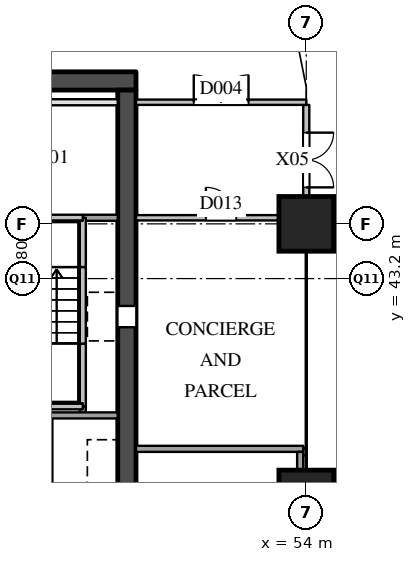
"""IFC4 building model, lengths in metres.
Left out: names, types, materials, properties, quantities, classifications, styles, units other than length and angle.
Written with IfcOpenShell. Run it as: python <this file> out.ifc"""

import sys

from ifc_helpers import new_model, si_unit, direction, frame, frame_2d, origin, origin_2d, place, context, subcontext, project, spatial, rectangle, extrude, element, fill, save


model = new_model("IFC4")
c1 = context("Model", 3, precision=1e-05, world=origin(), true_north=direction((0.0, 1.0)))
c2 = subcontext(c1, "Body", "Model", "MODEL_VIEW")
j1 = project(units=[si_unit("LENGTHUNIT", "METRE"), si_unit("PLANEANGLEUNIT", "RADIAN")], contexts=[c1])
p1 = place(None, origin())
s1 = spatial("IfcSite", under=j1, at=p1, CompositionType="ELEMENT")
p2 = place(p1, origin())
s2 = spatial("IfcBuilding", under=s1, at=p2, CompositionType="ELEMENT")
p3 = place(p2, origin())
s3 = spatial("IfcBuildingStorey", under=s2, at=p3, CompositionType="ELEMENT", Elevation=0.0)
for number, where, z_axis, x_axis in (
    (1, (54.0, 36.0, 0.0), (0.0, 0.0, 1.0), (1.0, 0.0, 0.0)),
    (2, (54.0, 45.0, 0.0), (0.0, 0.0, 1.0), (1.0, 0.0, 0.0)),
):
    element("IfcColumn", number, at=place(p3, frame(where, z_axis=z_axis, x_axis=x_axis)), inside=s3, PredefinedType="COLUMN", context=c2, shape_type="SweptSolid", body=[
        extrude(rectangle(XDim=1.8, YDim=1.8, at=origin_2d()), origin(), (0.0, 0.0, 1.0), 8.0),
    ])
p4 = place(p3, frame((54.0, 45.9, 0.0), z_axis=(0.0, 0.0, 1.0), x_axis=(0.0, 1.0, 0.0)))
e3 = element("IfcWall", 3, at=p4, inside=s3, PredefinedType="SOLIDWALL", context=c2, shape_type="SweptSolid", body=[
    extrude(rectangle(XDim=3.013, YDim=0.2, at=frame_2d((1.506, 0.0))), origin(), (0.0, 0.0, 1.0), 6.59),
])
p5 = place(p4, frame((2.1, 0.0, 0.0), z_axis=(0.0, 0.0, 1.0), x_axis=(-1.0, 0.0, 0.0)))
e4 = element("IfcOpeningElement", 4, at=p5, cuts=e3, PredefinedType="OPENING", context=c2, shape_type="SweptSolid", body=[
    extrude(rectangle(XDim=1.8, YDim=2.4, at=frame_2d((0.9, 1.2))), frame((0.0, 0.11, 0.0), z_axis=(0.0, -1.0, 0.0), x_axis=(1.0, 0.0, 0.0)), (0.0, 0.0, 1.0), 0.22),
])
p6 = place(p3, frame((36.0, 49.7, 0.0), z_axis=(0.0, 0.0, 1.0), x_axis=(1.0, 0.0, 0.0)))
e5 = element("IfcWall", 5, at=p6, inside=s3, PredefinedType="SHEAR", context=c2, shape_type="SweptSolid", body=[
    extrude(rectangle(XDim=12.4, YDim=0.6, at=frame_2d((6.2, 0.0))), origin(), (0.0, 0.0, 1.0), 7.59),
])
p7 = place(p3, frame((48.1, 29.1, 0.0), z_axis=(0.0, 0.0, 1.0), x_axis=(0.0, 1.0, 0.0)))
e6 = element("IfcWall", 6, at=p7, inside=s3, PredefinedType="SHEAR", context=c2, shape_type="SweptSolid", body=[
    extrude(rectangle(XDim=20.3, YDim=0.6, at=frame_2d((10.15, 0.0))), origin(), (0.0, 0.0, 1.0), 7.59),
])
p8 = place(p7, frame((12.5, 0.0, 0.0)))
e7 = element("IfcOpeningElement", 7, at=p8, cuts=e6, PredefinedType="OPENING", context=c2, shape_type="SweptSolid", body=[
    extrude(rectangle(XDim=0.7, YDim=2.1, at=frame_2d((0.35, 1.05))), frame((0.0, 0.31, 0.0), z_axis=(0.0, -1.0, 0.0), x_axis=(1.0, 0.0, 0.0)), (0.0, 0.0, 1.0), 0.62),
])
p9 = place(p7, frame((4.0, 0.0, 0.0)))
e8 = element("IfcOpeningElement", 8, at=p9, cuts=e6, PredefinedType="OPENING", context=c2, shape_type="SweptSolid", body=[
    extrude(rectangle(XDim=1.0, YDim=2.1, at=frame_2d((0.5, 1.05))), frame((0.0, 0.31, 0.0), z_axis=(0.0, -1.0, 0.0), x_axis=(1.0, 0.0, 0.0)), (0.0, 0.0, 1.0), 0.62),
])
p10 = place(p3, frame((45.55, 35.5, 0.0), z_axis=(0.0, 0.0, 1.0), x_axis=(0.0, 1.0, 0.0)))
e9 = element("IfcWall", 9, at=p10, inside=s3, PredefinedType="SOLIDWALL", context=c2, shape_type="SweptSolid", body=[
    extrude(rectangle(XDim=3.2, YDim=0.2, at=frame_2d((1.6, 0.0))), origin(), (0.0, 0.0, 1.0), 7.59),
])
p11 = place(p3, frame((46.65, 38.7, 0.0), z_axis=(0.0, 0.0, 1.0), x_axis=(0.0, 1.0, 0.0)))
e10 = element("IfcWall", 10, at=p11, inside=s3, PredefinedType="SOLIDWALL", context=c2, shape_type="SweptSolid", body=[
    extrude(rectangle(XDim=0.3, YDim=0.2, at=frame_2d((0.15, 0.0))), origin(), (0.0, 0.0, 1.0), 7.59),
])
p12 = place(p3, frame((46.65, 39.0, 0.0), z_axis=(0.0, 0.0, 1.0), x_axis=(0.0, 1.0, 0.0)))
e11 = element("IfcWall", 11, at=p12, inside=s3, PredefinedType="SOLIDWALL", context=c2, shape_type="SweptSolid", body=[
    extrude(rectangle(XDim=2.06, YDim=0.2, at=frame_2d((1.03, 0.0))), origin(), (0.0, 0.0, 1.0), 7.59),
])
p13 = place(p3, frame((46.65, 41.06, 0.0), z_axis=(0.0, 0.0, 1.0), x_axis=(0.0, 1.0, 0.0)))
e12 = element("IfcWall", 12, at=p13, inside=s3, PredefinedType="SOLIDWALL", context=c2, shape_type="SweptSolid", body=[
    extrude(rectangle(XDim=2.52, YDim=0.2, at=frame_2d((1.26, 0.0))), origin(), (0.0, 0.0, 1.0), 7.59),
])
p14 = place(p3, frame((46.65, 43.58, 0.0), z_axis=(0.0, 0.0, 1.0), x_axis=(0.0, 1.0, 0.0)))
e13 = element("IfcWall", 13, at=p14, inside=s3, PredefinedType="SOLIDWALL", context=c2, shape_type="SweptSolid", body=[
    extrude(rectangle(XDim=1.62, YDim=0.2, at=frame_2d((0.81, 0.0))), origin(), (0.0, 0.0, 1.0), 7.59),
])
p15 = place(p3, frame((43.3, 38.7, 0.0), z_axis=(0.0, 0.0, 1.0), x_axis=(1.0, 0.0, 0.0)))
e14 = element("IfcWall", 14, at=p15, inside=s3, PredefinedType="SOLIDWALL", context=c2, shape_type="SweptSolid", body=[
    extrude(rectangle(XDim=4.5, YDim=0.2, at=frame_2d((2.25, 0.0))), origin(), (0.0, 0.0, 1.0), 7.59),
])
p16 = place(p3, frame((43.4, 39.0, 0.0), z_axis=(0.0, 0.0, 1.0), x_axis=(1.0, 0.0, 0.0)))
e15 = element("IfcWall", 15, at=p16, inside=s3, PredefinedType="SOLIDWALL", context=c2, shape_type="SweptSolid", body=[
    extrude(rectangle(XDim=3.25, YDim=0.2, at=frame_2d((1.625, 0.0))), origin(), (0.0, 0.0, 1.0), 7.59),
])
p17 = place(p3, frame((46.65, 45.2, 0.0), z_axis=(0.0, 0.0, 1.0), x_axis=(1.0, 0.0, 0.0)))
e16 = element("IfcWall", 16, at=p17, inside=s3, PredefinedType="SOLIDWALL", context=c2, shape_type="SweptSolid", body=[
    extrude(rectangle(XDim=1.15, YDim=0.2, at=frame_2d((0.575, 0.0))), origin(), (0.0, 0.0, 1.0), 7.59),
])
p18 = place(p3, frame((43.4, 45.2, 0.0), z_axis=(0.0, 0.0, 1.0), x_axis=(1.0, 0.0, 0.0)))
e17 = element("IfcWall", 17, at=p18, inside=s3, PredefinedType="SOLIDWALL", context=c2, shape_type="SweptSolid", body=[
    extrude(rectangle(XDim=3.25, YDim=0.2, at=frame_2d((1.625, 0.0))), origin(), (0.0, 0.0, 1.0), 7.59),
])
p19 = place(p18, frame((1.025, 0.0, 0.0)))
e18 = element("IfcOpeningElement", 18, at=p19, cuts=e17, PredefinedType="OPENING", context=c2, shape_type="SweptSolid", body=[
    extrude(rectangle(XDim=1.1, YDim=2.1, at=frame_2d((0.55, 1.05))), frame((0.0, 0.11, 0.0), z_axis=(0.0, -1.0, 0.0), x_axis=(1.0, 0.0, 0.0)), (0.0, 0.0, 1.0), 0.22),
])
p20 = place(p3, frame((36.6, 49.0, 0.0), z_axis=(0.0, 0.0, 1.0), x_axis=(1.0, 0.0, 0.0)))
e19 = element("IfcWall", 19, at=p20, inside=s3, PredefinedType="PARTITIONING", context=c2, shape_type="SweptSolid", body=[
    extrude(rectangle(XDim=11.2, YDim=0.2, at=frame_2d((5.6, 0.0))), origin(), (0.0, 0.0, 1.0), 7.59),
])
p21 = place(p3, frame((48.4, 37.6, 0.0), z_axis=(0.0, 0.0, 1.0), x_axis=(1.0, 0.0, 0.0)))
e20 = element("IfcWall", 20, at=p21, inside=s3, PredefinedType="SOLIDWALL", context=c2, shape_type="SweptSolid", body=[
    extrude(rectangle(XDim=5.5, YDim=0.2, at=frame_2d((2.75, 0.0))), origin(), (0.0, 0.0, 1.0), 7.59),
])
p22 = place(p3, frame((53.8, 32.3, 0.0), z_axis=(0.0, 0.0, 1.0), x_axis=(0.0, 1.0, 0.0)))
e21 = element("IfcWall", 21, at=p22, inside=s3, PredefinedType="SOLIDWALL", context=c2, shape_type="SweptSolid", body=[
    extrude(rectangle(XDim=5.2, YDim=0.2, at=frame_2d((2.6, 0.0))), origin(), (0.0, 0.0, 1.0), 6.59),
])
p23 = place(p22, frame((2.5, 0.0, 0.0), z_axis=(0.0, 0.0, 1.0), x_axis=(-1.0, 0.0, 0.0)))
e22 = element("IfcOpeningElement", 22, at=p23, cuts=e21, PredefinedType="OPENING", context=c2, shape_type="SweptSolid", body=[
    extrude(rectangle(XDim=1.8, YDim=2.4, at=frame_2d((0.9, 1.2))), frame((0.0, 0.11, 0.0), z_axis=(0.0, -1.0, 0.0), x_axis=(1.0, 0.0, 0.0)), (0.0, 0.0, 1.0), 0.22),
])
p24 = place(p3, frame((48.4, 45.2, 0.0), z_axis=(0.0, 0.0, 1.0), x_axis=(1.0, 0.0, 0.0)))
e23 = element("IfcWall", 23, at=p24, inside=s3, PredefinedType="PARTITIONING", context=c2, shape_type="SweptSolid", body=[
    extrude(rectangle(XDim=5.6, YDim=0.175, at=frame_2d((2.8, 0.0))), origin(), (0.0, 0.0, 1.0), 7.59),
])
p25 = place(p24, frame((2.3, 0.0, 0.0)))
e24 = element("IfcOpeningElement", 24, at=p25, cuts=e23, PredefinedType="OPENING", context=c2, shape_type="SweptSolid", body=[
    extrude(rectangle(XDim=1.0, YDim=2.1, at=frame_2d((0.5, 1.05))), frame((0.0, 0.097, 0.0), z_axis=(0.0, -1.0, 0.0), x_axis=(1.0, 0.0, 0.0)), (0.0, 0.0, 1.0), 0.195),
])
p26 = place(p3, frame((48.4, 49.0, 0.0), z_axis=(0.0, 0.0, 1.0), x_axis=(1.0, 0.0, 0.0)))
e25 = element("IfcWall", 25, at=p26, inside=s3, PredefinedType="PARTITIONING", context=c2, shape_type="SweptSolid", body=[
    extrude(rectangle(XDim=5.6, YDim=0.175, at=frame_2d((2.8, 0.0))), origin(), (0.0, 0.0, 1.0), 6.59),
])
p27 = place(p26, frame((1.9, 0.0, 0.0)))
e26 = element("IfcOpeningElement", 26, at=p27, cuts=e25, PredefinedType="OPENING", context=c2, shape_type="SweptSolid", body=[
    extrude(rectangle(XDim=1.8, YDim=2.1, at=frame_2d((0.9, 1.05))), frame((0.0, 0.097, 0.0), z_axis=(0.0, -1.0, 0.0), x_axis=(1.0, 0.0, 0.0)), (0.0, 0.0, 1.0), 0.195),
])
p28 = place(p3, frame((53.9, 37.5, 0.0), z_axis=(0.0, 0.0, 1.0), x_axis=(1.0, 0.0, 0.0)))
e27 = element("IfcWall", 27, at=p28, inside=s3, PredefinedType="PARTITIONING", context=c2, shape_type="SweptSolid", body=[
    extrude(rectangle(XDim=0.1, YDim=0.25, at=frame_2d((0.05, 0.0))), origin(), (0.0, 0.0, 1.0), 6.59),
])
p29 = place(p5, origin())
e28 = element("IfcDoor", 28, at=p29, inside=s3, OperationType="DOUBLE_DOOR_SINGLE_SWING", PredefinedType="DOOR", context=c2, shape_type="SweptSolid", body=[
    extrude(rectangle(XDim=1.8, YDim=2.4, at=frame_2d((0.9, 1.2))), frame((0.0, 0.025, 0.0), z_axis=(0.0, -1.0, 0.0), x_axis=(1.0, 0.0, 0.0)), (0.0, 0.0, 1.0), 0.05),
])
fill(e4, e28)
p30 = place(p8, origin())
e29 = element("IfcDoor", 29, at=p30, inside=s3, OperationType="SINGLE_SWING_RIGHT", PredefinedType="DOOR", context=c2, shape_type="SweptSolid", body=[
    extrude(rectangle(XDim=0.7, YDim=2.1, at=frame_2d((0.35, 1.05))), frame((0.0, 0.025, 0.0), z_axis=(0.0, -1.0, 0.0), x_axis=(1.0, 0.0, 0.0)), (0.0, 0.0, 1.0), 0.05),
])
fill(e7, e29)
p31 = place(p27, origin())
e30 = element("IfcDoor", 30, at=p31, inside=s3, OperationType="DOUBLE_DOOR_SINGLE_SWING", PredefinedType="DOOR", context=c2, shape_type="SweptSolid", body=[
    extrude(rectangle(XDim=1.8, YDim=2.1, at=frame_2d((0.9, 1.05))), frame((0.0, 0.025, 0.0), z_axis=(0.0, -1.0, 0.0), x_axis=(1.0, 0.0, 0.0)), (0.0, 0.0, 1.0), 0.05),
])
fill(e26, e30)
p32 = place(p25, origin())
e31 = element("IfcDoor", 31, at=p32, inside=s3, OperationType="SINGLE_SWING_LEFT", PredefinedType="DOOR", context=c2, shape_type="SweptSolid", body=[
    extrude(rectangle(XDim=1.0, YDim=2.1, at=frame_2d((0.5, 1.05))), frame((0.0, 0.025, 0.0), z_axis=(0.0, -1.0, 0.0), x_axis=(1.0, 0.0, 0.0)), (0.0, 0.0, 1.0), 0.05),
])
fill(e24, e31)
save(model, sys.argv[1])
